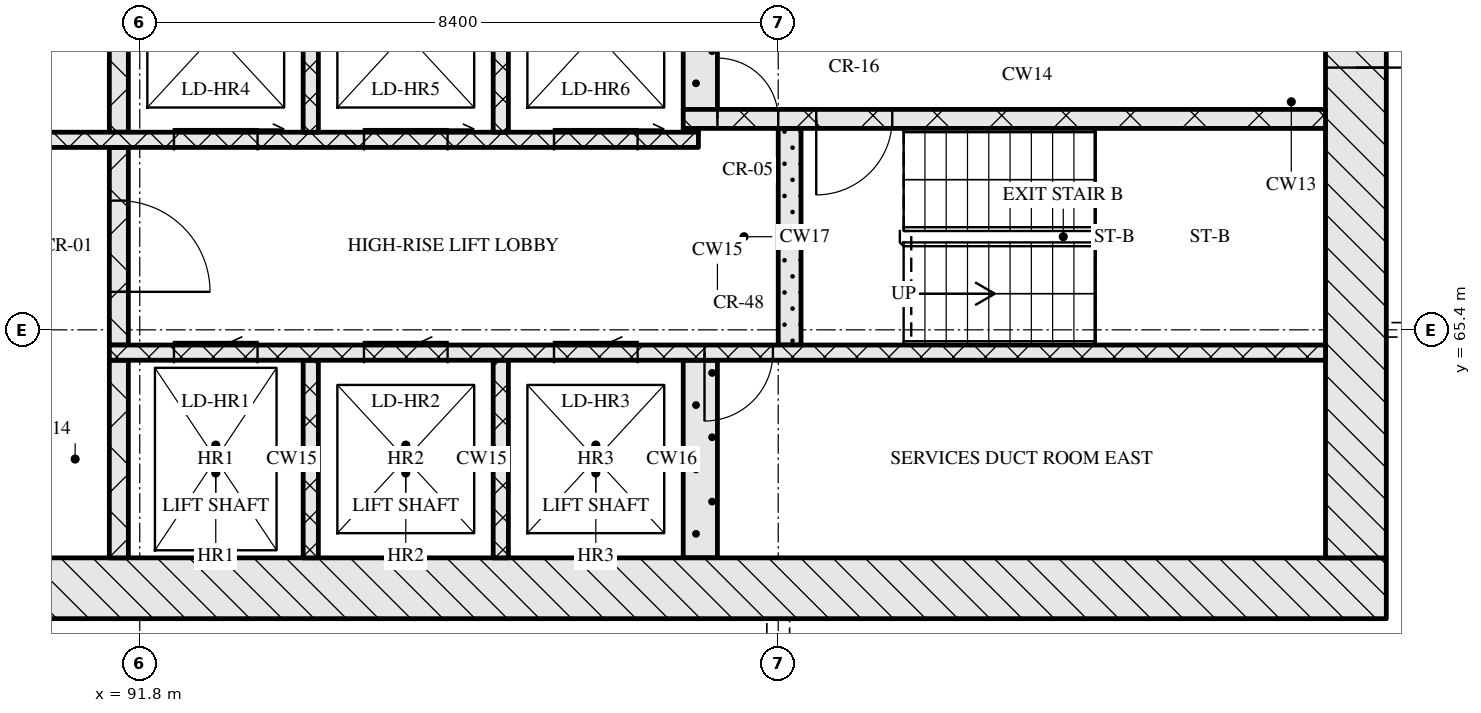
"""IFC4 building model, lengths in metres.
Left out: names, types, materials, properties, quantities, classifications, styles, units other than length and angle.
Written with IfcOpenShell. Run it as: python <this file> out.ifc"""

import sys

from ifc_helpers import new_model, si_unit, direction, frame, frame_2d, origin, place, context, subcontext, project, spatial, rectangle, extrude, element, fill, save


model = new_model("IFC4")
c1 = context("Model", 3, precision=1e-05, world=origin(), true_north=direction((0.0, 1.0)))
c2 = subcontext(c1, "Body", "Model", "MODEL_VIEW")
j1 = project(units=[si_unit("LENGTHUNIT", "METRE"), si_unit("PLANEANGLEUNIT", "RADIAN")], contexts=[c1])
p1 = place(None, origin())
s1 = spatial("IfcSite", under=j1, at=p1, CompositionType="ELEMENT")
p2 = place(p1, origin())
s2 = spatial("IfcBuilding", under=s1, at=p2, CompositionType="ELEMENT")
p3 = place(p2, frame((0.0, 0.0, 147.45)))
s3 = spatial("IfcBuildingStorey", under=s2, at=p3, CompositionType="ELEMENT", Elevation=147.45)
p4 = place(p3, frame((67.0, 62.0, 0.0), z_axis=(0.0, 0.0, 1.0), x_axis=(1.0, 0.0, 0.0)))
e1 = element("IfcWall", 1, at=p4, inside=s3, PredefinedType="SOLIDWALL", context=c2, shape_type="SweptSolid", body=[
    extrude(rectangle(XDim=41.2, YDim=0.8, at=frame_2d((20.6, 0.0))), origin(), (0.0, 0.0, 1.0), 3.32),
])
p5 = place(p4, frame((20.95, 0.0, 0.0)))
e2 = element("IfcOpeningElement", 2, at=p5, cuts=e1, PredefinedType="OPENING", context=c2, shape_type="SweptSolid", body=[
    extrude(rectangle(XDim=1.8, YDim=2.1, at=frame_2d((0.9, 1.05))), frame((0.0, 0.41, 0.0), z_axis=(0.0, -1.0, 0.0), x_axis=(1.0, 0.0, 0.0)), (0.0, 0.0, 1.0), 0.82),
])
p6 = place(p3, frame((107.8, 62.4, 0.0), z_axis=(0.0, 0.0, 1.0), x_axis=(0.0, 1.0, 0.0)))
e3 = element("IfcWall", 3, at=p6, inside=s3, PredefinedType="SOLIDWALL", context=c2, shape_type="SweptSolid", body=[
    extrude(rectangle(XDim=12.0, YDim=0.8, at=frame_2d((6.0, 0.0))), origin(), (0.0, 0.0, 1.0), 3.32),
])
p7 = place(p6, frame((6.45, 0.0, 0.0)))
e4 = element("IfcOpeningElement", 4, at=p7, cuts=e3, PredefinedType="OPENING", context=c2, shape_type="SweptSolid", body=[
    extrude(rectangle(XDim=1.2, YDim=2.1, at=frame_2d((0.6, 1.05))), frame((0.0, 0.41, 0.0), z_axis=(0.0, -1.0, 0.0), x_axis=(1.0, 0.0, 0.0)), (0.0, 0.0, 1.0), 0.82),
])
p8 = place(p3, frame((91.525, 62.4, 0.0), z_axis=(0.0, 0.0, 1.0), x_axis=(0.0, 1.0, 0.0)))
e5 = element("IfcWall", 5, at=p8, inside=s3, PredefinedType="SOLIDWALL", context=c2, shape_type="SweptSolid", body=[
    extrude(rectangle(XDim=2.6, YDim=0.25, at=frame_2d((1.3, 0.0))), origin(), (0.0, 0.0, 1.0), 3.32),
])
for number, where, z_axis, x_axis in (
    (6, (94.05, 62.4, 0.0), (0.0, 0.0, 1.0), (0.0, 1.0, 0.0)),
    (7, (96.55, 62.4, 0.0), (0.0, 0.0, 1.0), (0.0, 1.0, 0.0)),
):
    element("IfcWall", number, at=place(p3, frame(where, z_axis=z_axis, x_axis=x_axis)), inside=s3, PredefinedType="SOLIDWALL", context=c2, shape_type="SweptSolid", body=[
        extrude(rectangle(XDim=2.6, YDim=0.2, at=frame_2d((1.3, 0.0))), origin(), (0.0, 0.0, 1.0), 3.32),
    ])
p9 = place(p3, frame((99.175, 62.4, 0.0), z_axis=(0.0, 0.0, 1.0), x_axis=(0.0, 1.0, 0.0)))
e8 = element("IfcWall", 8, at=p9, inside=s3, PredefinedType="SOLIDWALL", context=c2, shape_type="SweptSolid", body=[
    extrude(rectangle(XDim=2.6, YDim=0.45, at=frame_2d((1.3, 0.0))), origin(), (0.0, 0.0, 1.0), 3.32),
])
p10 = place(p3, frame((91.4, 65.1, 0.0), z_axis=(0.0, 0.0, 1.0), x_axis=(1.0, 0.0, 0.0)))
e9 = element("IfcWall", 9, at=p10, inside=s3, PredefinedType="SOLIDWALL", context=c2, shape_type="SweptSolid", body=[
    extrude(rectangle(XDim=16.0, YDim=0.2, at=frame_2d((8.0, 0.0))), origin(), (0.0, 0.0, 1.0), 3.32),
])
p11 = place(p10, frame((0.85, 0.0, 0.0)))
e10 = element("IfcOpeningElement", 10, at=p11, cuts=e9, PredefinedType="OPENING", context=c2, shape_type="SweptSolid", body=[
    extrude(rectangle(XDim=1.1, YDim=2.1, at=frame_2d((0.55, 1.05))), frame((0.0, 0.11, 0.0), z_axis=(0.0, -1.0, 0.0), x_axis=(1.0, 0.0, 0.0)), (0.0, 0.0, 1.0), 0.22),
])
p12 = place(p10, frame((3.35, 0.0, 0.0)))
e11 = element("IfcOpeningElement", 11, at=p12, cuts=e9, PredefinedType="OPENING", context=c2, shape_type="SweptSolid", body=[
    extrude(rectangle(XDim=1.1, YDim=2.1, at=frame_2d((0.55, 1.05))), frame((0.0, 0.11, 0.0), z_axis=(0.0, -1.0, 0.0), x_axis=(1.0, 0.0, 0.0)), (0.0, 0.0, 1.0), 0.22),
])
p13 = place(p10, frame((5.85, 0.0, 0.0)))
e12 = element("IfcOpeningElement", 12, at=p13, cuts=e9, PredefinedType="OPENING", context=c2, shape_type="SweptSolid", body=[
    extrude(rectangle(XDim=1.1, YDim=2.1, at=frame_2d((0.55, 1.05))), frame((0.0, 0.11, 0.0), z_axis=(0.0, -1.0, 0.0), x_axis=(1.0, 0.0, 0.0)), (0.0, 0.0, 1.0), 0.22),
])
p14 = place(p10, frame((7.83, 0.0, 0.0)))
e13 = element("IfcOpeningElement", 13, at=p14, cuts=e9, PredefinedType="OPENING", context=c2, shape_type="SweptSolid", body=[
    extrude(rectangle(XDim=0.9, YDim=2.1, at=frame_2d((0.45, 1.05))), frame((0.0, 0.11, 0.0), z_axis=(0.0, -1.0, 0.0), x_axis=(1.0, 0.0, 0.0)), (0.0, 0.0, 1.0), 0.22),
])
p15 = place(p3, frame((91.525, 65.2, 0.0), z_axis=(0.0, 0.0, 1.0), x_axis=(0.0, 1.0, 0.0)))
e14 = element("IfcWall", 14, at=p15, inside=s3, PredefinedType="SOLIDWALL", context=c2, shape_type="SweptSolid", body=[
    extrude(rectangle(XDim=2.6, YDim=0.25, at=frame_2d((1.3, 0.0))), origin(), (0.0, 0.0, 1.0), 3.32),
])
p16 = place(p15, frame((0.7, 0.0, 0.0)))
e15 = element("IfcOpeningElement", 15, at=p16, cuts=e14, PredefinedType="OPENING", context=c2, shape_type="SweptSolid", body=[
    extrude(rectangle(XDim=1.2, YDim=2.1, at=frame_2d((0.6, 1.05))), frame((0.0, 0.135, 0.0), z_axis=(0.0, -1.0, 0.0), x_axis=(1.0, 0.0, 0.0)), (0.0, 0.0, 1.0), 0.27),
])
p17 = place(p3, frame((100.35, 65.2, 0.0), z_axis=(0.0, 0.0, 1.0), x_axis=(0.0, 1.0, 0.0)))
e16 = element("IfcWall", 16, at=p17, inside=s3, PredefinedType="SOLIDWALL", context=c2, shape_type="SweptSolid", body=[
    extrude(rectangle(XDim=2.85, YDim=0.3, at=frame_2d((1.425, 0.0))), origin(), (0.0, 0.0, 1.0), 3.32),
])
p18 = place(p3, frame((76.05, 67.9, 0.0), z_axis=(0.0, 0.0, 1.0), x_axis=(1.0, 0.0, 0.0)))
e17 = element("IfcWall", 17, at=p18, inside=s3, PredefinedType="SOLIDWALL", context=c2, shape_type="SweptSolid", body=[
    extrude(rectangle(XDim=23.1, YDim=0.2, at=frame_2d((11.55, 0.0))), origin(), (0.0, 0.0, 1.0), 3.32),
])
p19 = place(p18, frame((1.4, 0.0, 0.0)))
e18 = element("IfcOpeningElement", 18, at=p19, cuts=e17, PredefinedType="OPENING", context=c2, shape_type="SweptSolid", body=[
    extrude(rectangle(XDim=0.9, YDim=2.1, at=frame_2d((0.45, 1.05))), frame((0.0, 0.11, 0.0), z_axis=(0.0, -1.0, 0.0), x_axis=(1.0, 0.0, 0.0)), (0.0, 0.0, 1.0), 0.22),
])
p20 = place(p18, frame((5.11, 0.0, 0.0)))
e19 = element("IfcOpeningElement", 19, at=p20, cuts=e17, PredefinedType="OPENING", context=c2, shape_type="SweptSolid", body=[
    extrude(rectangle(XDim=0.9, YDim=2.1, at=frame_2d((0.45, 1.05))), frame((0.0, 0.11, 0.0), z_axis=(0.0, -1.0, 0.0), x_axis=(1.0, 0.0, 0.0)), (0.0, 0.0, 1.0), 0.22),
])
p21 = place(p18, frame((8.45, 0.0, 0.0)))
e20 = element("IfcOpeningElement", 20, at=p21, cuts=e17, PredefinedType="OPENING", context=c2, shape_type="SweptSolid", body=[
    extrude(rectangle(XDim=0.9, YDim=2.1, at=frame_2d((0.45, 1.05))), frame((0.0, 0.11, 0.0), z_axis=(0.0, -1.0, 0.0), x_axis=(1.0, 0.0, 0.0)), (0.0, 0.0, 1.0), 0.22),
])
p22 = place(p18, frame((10.91, 0.0, 0.0)))
e21 = element("IfcOpeningElement", 21, at=p22, cuts=e17, PredefinedType="OPENING", context=c2, shape_type="SweptSolid", body=[
    extrude(rectangle(XDim=0.9, YDim=2.1, at=frame_2d((0.45, 1.05))), frame((0.0, 0.11, 0.0), z_axis=(0.0, -1.0, 0.0), x_axis=(1.0, 0.0, 0.0)), (0.0, 0.0, 1.0), 0.22),
])
p23 = place(p18, frame((13.55, 0.0, 0.0)))
e22 = element("IfcOpeningElement", 22, at=p23, cuts=e17, PredefinedType="OPENING", context=c2, shape_type="SweptSolid", body=[
    extrude(rectangle(XDim=1.0, YDim=2.1, at=frame_2d((0.5, 1.05))), frame((0.0, 0.11, 0.0), z_axis=(0.0, -1.0, 0.0), x_axis=(1.0, 0.0, 0.0)), (0.0, 0.0, 1.0), 0.22),
])
p24 = place(p18, frame((16.2, 0.0, 0.0)))
e23 = element("IfcOpeningElement", 23, at=p24, cuts=e17, PredefinedType="OPENING", context=c2, shape_type="SweptSolid", body=[
    extrude(rectangle(XDim=1.1, YDim=2.1, at=frame_2d((0.55, 1.05))), frame((0.0, 0.11, 0.0), z_axis=(0.0, -1.0, 0.0), x_axis=(1.0, 0.0, 0.0)), (0.0, 0.0, 1.0), 0.22),
])
p25 = place(p18, frame((18.7, 0.0, 0.0)))
e24 = element("IfcOpeningElement", 24, at=p25, cuts=e17, PredefinedType="OPENING", context=c2, shape_type="SweptSolid", body=[
    extrude(rectangle(XDim=1.1, YDim=2.1, at=frame_2d((0.55, 1.05))), frame((0.0, 0.11, 0.0), z_axis=(0.0, -1.0, 0.0), x_axis=(1.0, 0.0, 0.0)), (0.0, 0.0, 1.0), 0.22),
])
p26 = place(p18, frame((21.2, 0.0, 0.0)))
e25 = element("IfcOpeningElement", 25, at=p26, cuts=e17, PredefinedType="OPENING", context=c2, shape_type="SweptSolid", body=[
    extrude(rectangle(XDim=1.1, YDim=2.1, at=frame_2d((0.55, 1.05))), frame((0.0, 0.11, 0.0), z_axis=(0.0, -1.0, 0.0), x_axis=(1.0, 0.0, 0.0)), (0.0, 0.0, 1.0), 0.22),
])
p27 = place(p3, frame((91.525, 68.0, 0.0), z_axis=(0.0, 0.0, 1.0), x_axis=(0.0, 1.0, 0.0)))
e26 = element("IfcWall", 26, at=p27, inside=s3, PredefinedType="SOLIDWALL", context=c2, shape_type="SweptSolid", body=[
    extrude(rectangle(XDim=2.6, YDim=0.25, at=frame_2d((1.3, 0.0))), origin(), (0.0, 0.0, 1.0), 3.32),
])
for number, where, z_axis, x_axis in (
    (27, (94.05, 68.0, 0.0), (0.0, 0.0, 1.0), (0.0, 1.0, 0.0)),
    (28, (96.55, 68.0, 0.0), (0.0, 0.0, 1.0), (0.0, 1.0, 0.0)),
):
    element("IfcWall", number, at=place(p3, frame(where, z_axis=z_axis, x_axis=x_axis)), inside=s3, PredefinedType="SOLIDWALL", context=c2, shape_type="SweptSolid", body=[
        extrude(rectangle(XDim=2.6, YDim=0.2, at=frame_2d((1.3, 0.0))), origin(), (0.0, 0.0, 1.0), 3.32),
    ])
p28 = place(p3, frame((98.95, 68.025, 0.0), z_axis=(0.0, 0.0, 1.0), x_axis=(1.0, 0.0, 0.0)))
e29 = element("IfcWall", 29, at=p28, inside=s3, PredefinedType="SOLIDWALL", context=c2, shape_type="SweptSolid", body=[
    extrude(rectangle(XDim=0.2, YDim=0.05, at=frame_2d((0.1, 0.0))), origin(), (0.0, 0.0, 1.0), 3.32),
])
p29 = place(p3, frame((98.95, 68.175, 0.0), z_axis=(0.0, 0.0, 1.0), x_axis=(1.0, 0.0, 0.0)))
e30 = element("IfcWall", 30, at=p29, inside=s3, PredefinedType="SOLIDWALL", context=c2, shape_type="SweptSolid", body=[
    extrude(rectangle(XDim=8.45, YDim=0.25, at=frame_2d((4.225, 0.0))), origin(), (0.0, 0.0, 1.0), 3.32),
])
p30 = place(p29, frame((0.45, 0.0, 0.0)))
e31 = element("IfcOpeningElement", 31, at=p30, cuts=e30, PredefinedType="OPENING", context=c2, shape_type="SweptSolid", body=[
    extrude(rectangle(XDim=0.8, YDim=2.1, at=frame_2d((0.4, 1.05))), frame((0.0, 0.135, 0.0), z_axis=(0.0, -1.0, 0.0), x_axis=(1.0, 0.0, 0.0)), (0.0, 0.0, 1.0), 0.27),
])
p31 = place(p29, frame((1.75, 0.0, 0.0)))
e32 = element("IfcOpeningElement", 32, at=p31, cuts=e30, PredefinedType="OPENING", context=c2, shape_type="SweptSolid", body=[
    extrude(rectangle(XDim=1.0, YDim=2.1, at=frame_2d((0.5, 1.05))), frame((0.0, 0.135, 0.0), z_axis=(0.0, -1.0, 0.0), x_axis=(1.0, 0.0, 0.0)), (0.0, 0.0, 1.0), 0.27),
])
p32 = place(p3, frame((99.175, 68.3, 0.0), z_axis=(0.0, 0.0, 1.0), x_axis=(0.0, 1.0, 0.0)))
e33 = element("IfcWall", 33, at=p32, inside=s3, PredefinedType="SOLIDWALL", context=c2, shape_type="SweptSolid", body=[
    extrude(rectangle(XDim=2.3, YDim=0.45, at=frame_2d((1.15, 0.0))), origin(), (0.0, 0.0, 1.0), 3.32),
])
p33 = place(p11, origin())
e34 = element("IfcDoor", 34, at=p33, inside=s3, OperationType="SLIDING_TO_LEFT", PredefinedType="DOOR", context=c2, shape_type="SweptSolid", body=[
    extrude(rectangle(XDim=1.1, YDim=2.1, at=frame_2d((0.55, 1.05))), frame((0.0, 0.025, 0.0), z_axis=(0.0, -1.0, 0.0), x_axis=(1.0, 0.0, 0.0)), (0.0, 0.0, 1.0), 0.05),
])
fill(e10, e34)
p34 = place(p12, origin())
e35 = element("IfcDoor", 35, at=p34, inside=s3, OperationType="SLIDING_TO_LEFT", PredefinedType="DOOR", context=c2, shape_type="SweptSolid", body=[
    extrude(rectangle(XDim=1.1, YDim=2.1, at=frame_2d((0.55, 1.05))), frame((0.0, 0.025, 0.0), z_axis=(0.0, -1.0, 0.0), x_axis=(1.0, 0.0, 0.0)), (0.0, 0.0, 1.0), 0.05),
])
fill(e11, e35)
p35 = place(p13, origin())
e36 = element("IfcDoor", 36, at=p35, inside=s3, OperationType="SLIDING_TO_LEFT", PredefinedType="DOOR", context=c2, shape_type="SweptSolid", body=[
    extrude(rectangle(XDim=1.1, YDim=2.1, at=frame_2d((0.55, 1.05))), frame((0.0, 0.025, 0.0), z_axis=(0.0, -1.0, 0.0), x_axis=(1.0, 0.0, 0.0)), (0.0, 0.0, 1.0), 0.05),
])
fill(e12, e36)
p36 = place(p14, origin())
e37 = element("IfcDoor", 37, at=p36, inside=s3, OperationType="SINGLE_SWING_RIGHT", PredefinedType="DOOR", context=c2, shape_type="SweptSolid", body=[
    extrude(rectangle(XDim=0.9, YDim=2.1, at=frame_2d((0.45, 1.05))), frame((0.0, 0.025, 0.0), z_axis=(0.0, -1.0, 0.0), x_axis=(1.0, 0.0, 0.0)), (0.0, 0.0, 1.0), 0.05),
])
fill(e13, e37)
p37 = place(p16, origin())
e38 = element("IfcDoor", 38, at=p37, inside=s3, OperationType="SINGLE_SWING_RIGHT", PredefinedType="DOOR", context=c2, shape_type="SweptSolid", body=[
    extrude(rectangle(XDim=1.2, YDim=2.1, at=frame_2d((0.6, 1.05))), frame((0.0, 0.025, 0.0), z_axis=(0.0, -1.0, 0.0), x_axis=(1.0, 0.0, 0.0)), (0.0, 0.0, 1.0), 0.05),
])
fill(e15, e38)
p38 = place(p24, origin())
e39 = element("IfcDoor", 39, at=p38, inside=s3, OperationType="SLIDING_TO_RIGHT", PredefinedType="DOOR", context=c2, shape_type="SweptSolid", body=[
    extrude(rectangle(XDim=1.1, YDim=2.1, at=frame_2d((0.55, 1.05))), frame((0.0, 0.025, 0.0), z_axis=(0.0, -1.0, 0.0), x_axis=(1.0, 0.0, 0.0)), (0.0, 0.0, 1.0), 0.05),
])
fill(e23, e39)
p39 = place(p25, origin())
e40 = element("IfcDoor", 40, at=p39, inside=s3, OperationType="SLIDING_TO_RIGHT", PredefinedType="DOOR", context=c2, shape_type="SweptSolid", body=[
    extrude(rectangle(XDim=1.1, YDim=2.1, at=frame_2d((0.55, 1.05))), frame((0.0, 0.025, 0.0), z_axis=(0.0, -1.0, 0.0), x_axis=(1.0, 0.0, 0.0)), (0.0, 0.0, 1.0), 0.05),
])
fill(e24, e40)
p40 = place(p26, origin())
e41 = element("IfcDoor", 41, at=p40, inside=s3, OperationType="SLIDING_TO_RIGHT", PredefinedType="DOOR", context=c2, shape_type="SweptSolid", body=[
    extrude(rectangle(XDim=1.1, YDim=2.1, at=frame_2d((0.55, 1.05))), frame((0.0, 0.025, 0.0), z_axis=(0.0, -1.0, 0.0), x_axis=(1.0, 0.0, 0.0)), (0.0, 0.0, 1.0), 0.05),
])
fill(e25, e41)
p41 = place(p30, origin())
e42 = element("IfcDoor", 42, at=p41, inside=s3, OperationType="SINGLE_SWING_LEFT", PredefinedType="DOOR", context=c2, shape_type="SweptSolid", body=[
    extrude(rectangle(XDim=0.8, YDim=2.1, at=frame_2d((0.4, 1.05))), frame((0.0, 0.025, 0.0), z_axis=(0.0, -1.0, 0.0), x_axis=(1.0, 0.0, 0.0)), (0.0, 0.0, 1.0), 0.05),
])
fill(e31, e42)
p42 = place(p31, origin())
e43 = element("IfcDoor", 43, at=p42, inside=s3, OperationType="SINGLE_SWING_RIGHT", PredefinedType="DOOR", context=c2, shape_type="SweptSolid", body=[
    extrude(rectangle(XDim=1.0, YDim=2.1, at=frame_2d((0.5, 1.05))), frame((0.0, 0.025, 0.0), z_axis=(0.0, -1.0, 0.0), x_axis=(1.0, 0.0, 0.0)), (0.0, 0.0, 1.0), 0.05),
])
fill(e32, e43)
p43 = place(p7, origin())
e44 = element("IfcDoor", 44, at=p43, inside=s3, OperationType="SINGLE_SWING_RIGHT", PredefinedType="DOOR", context=c2, shape_type="SweptSolid", body=[
    extrude(rectangle(XDim=1.2, YDim=2.1, at=frame_2d((0.6, 1.05))), frame((0.0, 0.025, 0.0), z_axis=(0.0, -1.0, 0.0), x_axis=(1.0, 0.0, 0.0)), (0.0, 0.0, 1.0), 0.05),
])
fill(e4, e44)
save(model, sys.argv[1])
